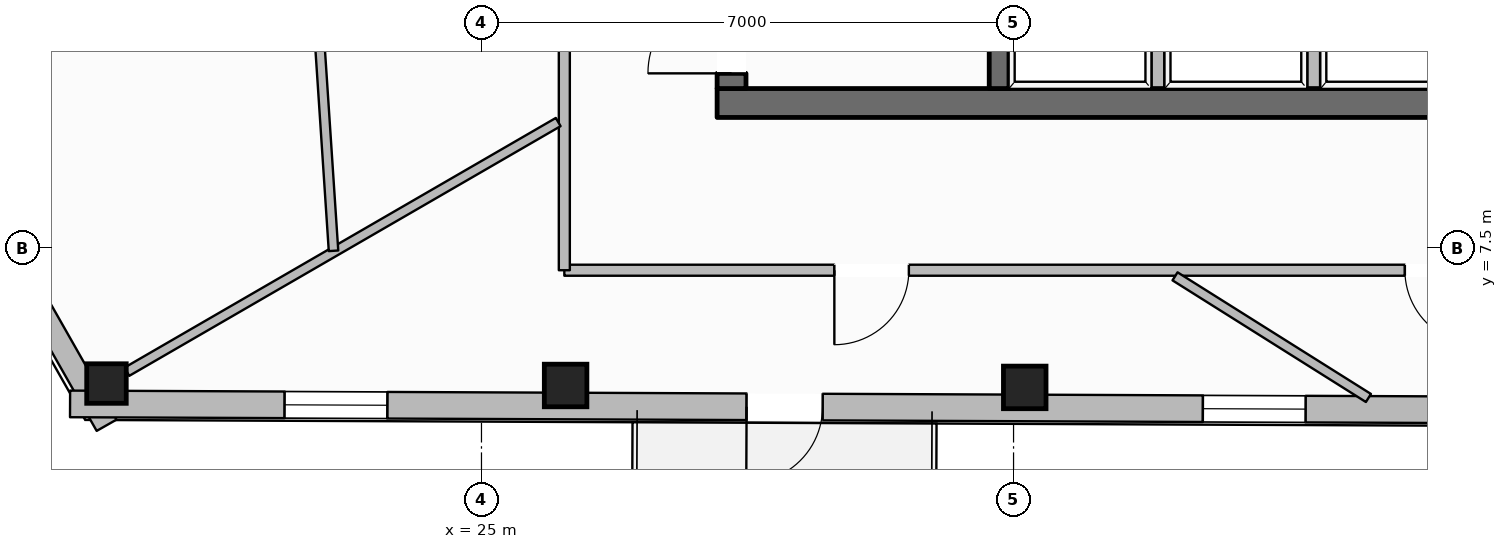
"""IFC4 building model, lengths in metres.
Left out: names, types, materials, properties, quantities, classifications, styles, units other than length and angle.
Written with IfcOpenShell. Run it as: python <this file> out.ifc"""

import sys

from ifc_helpers import new_model, si_unit, direction, frame, frame_2d, origin, origin_2d, place, context, subcontext, project, spatial, rectangle, hollow_rectangle, extrude, element, fill, save


model = new_model("IFC4")
c1 = context("Model", 3, precision=1e-05, world=origin(), true_north=direction((0.0, 1.0)))
c2 = subcontext(c1, "Body", "Model", "MODEL_VIEW")
j1 = project(units=[si_unit("LENGTHUNIT", "METRE"), si_unit("PLANEANGLEUNIT", "RADIAN")], contexts=[c1])
p1 = place(None, origin())
s1 = spatial("IfcSite", under=j1, at=p1, CompositionType="ELEMENT")
p2 = place(p1, origin())
s2 = spatial("IfcBuilding", under=s1, at=p2, CompositionType="ELEMENT")
p3 = place(p2, frame((0.0, 0.0, 239.5)))
s3 = spatial("IfcBuildingStorey", under=s2, at=p3, CompositionType="ELEMENT", Elevation=239.5)
p4 = place(p3, frame((28.1, 9.41, 0.0), z_axis=(0.0, 0.0, 1.0), x_axis=(1.0, 0.0, 0.0)))
e1 = element("IfcWall", 1, at=p4, inside=s3, PredefinedType="SOLIDWALL", context=c2, shape_type="SweptSolid", body=[
    extrude(rectangle(XDim=19.8, YDim=0.38, at=frame_2d((9.9, 0.0))), origin(), (0.0, 0.0, 1.0), 3.61),
])
p5 = place(p4, frame((10.4, 0.0, 0.0)))
e2 = element("IfcOpeningElement", 2, at=p5, cuts=e1, PredefinedType="OPENING", context=c2, shape_type="SweptSolid", body=[
    extrude(rectangle(XDim=1.4, YDim=2.2, at=frame_2d((0.7, 1.1))), frame((0.0, 0.2, 0.0), z_axis=(0.0, -1.0, 0.0), x_axis=(1.0, 0.0, 0.0)), (0.0, 0.0, 1.0), 0.4),
])
p6 = place(p3, frame((28.29, 9.6, 0.0), z_axis=(0.0, 0.0, 1.0), x_axis=(0.0, 1.0, 0.0)))
e3 = element("IfcWall", 3, at=p6, inside=s3, PredefinedType="SOLIDWALL", context=c2, shape_type="SweptSolid", body=[
    extrude(rectangle(XDim=13.0, YDim=0.38, at=frame_2d((6.5, 0.0))), origin(), (0.0, 0.0, 1.0), 3.61),
])
p7 = place(p6, frame((0.2, 0.0, 0.0)))
e4 = element("IfcOpeningElement", 4, at=p7, cuts=e3, PredefinedType="OPENING", context=c2, shape_type="SweptSolid", body=[
    extrude(rectangle(XDim=1.1, YDim=2.15, at=frame_2d((0.55, 1.075))), frame((0.0, 0.2, 0.0), z_axis=(0.0, -1.0, 0.0), x_axis=(1.0, 0.0, 0.0)), (0.0, 0.0, 1.0), 0.4),
])
p8 = place(p6, frame((8.4, 0.0, 0.0)))
e5 = element("IfcOpeningElement", 5, at=p8, cuts=e3, PredefinedType="OPENING", context=c2, shape_type="SweptSolid", body=[
    extrude(rectangle(XDim=0.9, YDim=2.1, at=frame_2d((0.45, 1.05))), frame((0.0, 0.2, 0.0), z_axis=(0.0, -1.0, 0.0), x_axis=(1.0, 0.0, 0.0)), (0.0, 0.0, 1.0), 0.4),
])
p9 = place(p3, frame((31.81, 9.6, 0.0), z_axis=(0.0, 0.0, 1.0), x_axis=(0.0, 1.0, 0.0)))
e6 = element("IfcWall", 6, at=p9, inside=s3, PredefinedType="SHEAR", context=c2, shape_type="SweptSolid", body=[
    extrude(rectangle(XDim=13.0, YDim=0.26, at=frame_2d((6.5, 0.0))), origin(), (0.0, 0.0, 1.0), 3.61),
])
p10 = place(p9, frame((10.925, 0.0, 0.0)))
e7 = element("IfcOpeningElement", 7, at=p10, cuts=e6, PredefinedType="OPENING", context=c2, shape_type="SweptSolid", body=[
    extrude(rectangle(XDim=1.25, YDim=2.25, at=frame_2d((0.625, 1.125))), frame((0.0, 0.14, 0.0), z_axis=(0.0, -1.0, 0.0), x_axis=(1.0, 0.0, 0.0)), (0.0, 0.0, 1.0), 0.28),
])
p11 = place(p3, frame((20.066, 5.719, 0.0), z_axis=(0.0, 0.0, 1.0), x_axis=(1.0, 0.0, 0.0)))
e8 = element("IfcColumn", 8, at=p11, inside=s3, PredefinedType="COLUMN", context=c2, shape_type="SweptSolid", body=[
    extrude(hollow_rectangle(XDim=0.52, YDim=0.52, WallThickness=0.024, at=origin_2d()), origin(), (0.0, 0.0, 1.0), 3.61),
])
for number, where, z_axis, x_axis in (
    (9, (26.107, 5.694, 0.0), (0.0, 0.0, 1.0), (1.0, 0.0, 0.0)),
    (10, (32.147, 5.668, 0.0), (0.0, 0.0, 1.0), (1.0, 0.0, 0.0)),
):
    element("IfcColumn", number, at=place(p3, frame(where, z_axis=z_axis, x_axis=x_axis)), inside=s3, PredefinedType="COLUMN", context=c2, shape_type="SweptSolid", body=[
        extrude(hollow_rectangle(XDim=0.56, YDim=0.56, WallThickness=0.025, at=origin_2d()), origin(), (0.0, 0.0, 1.0), 3.61),
    ])
p12 = place(p3, frame((20.068, 5.17, 0.0), z_axis=(0.0, 0.0, 1.0), x_axis=(-0.494295761475, 0.869293793943, 0.0)))
e11 = element("IfcWall", 11, at=p12, inside=s3, PredefinedType="STANDARD", context=c2, shape_type="SweptSolid", body=[
    extrude(rectangle(XDim=7.836, YDim=0.3, at=frame_2d((3.918, 0.0))), origin(), (0.0, 0.0, 1.0), 3.196),
])
p13 = place(p12, frame((3.393, 0.0, 0.65)))
e12 = element("IfcOpeningElement", 12, at=p13, cuts=e11, PredefinedType="OPENING", context=c2, shape_type="SweptSolid", body=[
    extrude(rectangle(XDim=1.05, YDim=1.7, at=frame_2d((0.525, 0.85))), frame((0.0, 0.16, 0.0), z_axis=(0.0, -1.0, 0.0), x_axis=(1.0, 0.0, 0.0)), (0.0, 0.0, 1.0), 0.32),
])
p14 = place(p3, frame((56.79, 5.294, 0.0), z_axis=(0.0, 0.0, 1.0), x_axis=(-0.999991124913, 0.004213086292, 0.0)))
e13 = element("IfcWall", 13, at=p14, inside=s3, PredefinedType="STANDARD", context=c2, shape_type="SweptSolid", body=[
    extrude(rectangle(XDim=37.203, YDim=0.35, at=frame_2d((18.601, 0.0))), origin(), (0.0, 0.0, 1.0), 3.196),
])
p15 = place(p14, frame((27.302, 0.0, 0.0)))
e14 = element("IfcOpeningElement", 14, at=p15, cuts=e13, PredefinedType="OPENING", context=c2, shape_type="SweptSolid", body=[
    extrude(rectangle(XDim=1.0, YDim=2.2, at=frame_2d((0.5, 1.1))), frame((0.0, 0.185, 0.0), z_axis=(0.0, -1.0, 0.0), x_axis=(1.0, 0.0, 0.0)), (0.0, 0.0, 1.0), 0.37),
])
p16 = place(p14, frame((33.03, 0.0, 0.65)))
e15 = element("IfcOpeningElement", 15, at=p16, cuts=e13, PredefinedType="OPENING", context=c2, shape_type="SweptSolid", body=[
    extrude(rectangle(XDim=1.35, YDim=1.75, at=frame_2d((0.675, 0.875))), frame((0.0, 0.185, 0.0), z_axis=(0.0, -1.0, 0.0), x_axis=(1.0, 0.0, 0.0)), (0.0, 0.0, 1.0), 0.37),
])
p17 = place(p14, frame((20.948, 0.0, 0.65)))
e16 = element("IfcOpeningElement", 16, at=p17, cuts=e13, PredefinedType="OPENING", context=c2, shape_type="SweptSolid", body=[
    extrude(rectangle(XDim=1.35, YDim=1.75, at=frame_2d((0.675, 0.875))), frame((0.0, 0.185, 0.0), z_axis=(0.0, -1.0, 0.0), x_axis=(1.0, 0.0, 0.0)), (0.0, 0.0, 1.0), 0.37),
])
p18 = place(p14, frame((8.868, 0.0, 0.65)))
e17 = element("IfcOpeningElement", 17, at=p18, cuts=e13, PredefinedType="OPENING", context=c2, shape_type="SweptSolid", body=[
    extrude(rectangle(XDim=1.35, YDim=1.75, at=frame_2d((0.675, 0.875))), frame((0.0, 0.185, 0.0), z_axis=(0.0, -1.0, 0.0), x_axis=(1.0, 0.0, 0.0)), (0.0, 0.0, 1.0), 0.37),
])
p19 = place(p14, frame((2.827, 0.0, 0.65)))
e18 = element("IfcOpeningElement", 18, at=p19, cuts=e13, PredefinedType="OPENING", context=c2, shape_type="SweptSolid", body=[
    extrude(rectangle(XDim=1.35, YDim=1.75, at=frame_2d((0.675, 0.875))), frame((0.0, 0.185, 0.0), z_axis=(0.0, -1.0, 0.0), x_axis=(1.0, 0.0, 0.0)), (0.0, 0.0, 1.0), 0.37),
])
for number, where, z_axis, x_axis in (
    (19, (33.9, 9.49, 0.0), (0.0, 0.0, 1.0), (0.0, 1.0, 0.0)),
    (20, (35.95, 9.49, 0.0), (0.0, 0.0, 1.0), (0.0, 1.0, 0.0)),
):
    element("IfcWall", number, at=place(p3, frame(where, z_axis=z_axis, x_axis=x_axis)), inside=s3, PredefinedType="PARTITIONING", context=c2, shape_type="SweptSolid", body=[
        extrude(rectangle(XDim=2.35, YDim=0.165, at=frame_2d((1.175, 0.0))), origin(), (0.0, 0.0, 1.0), 3.61),
    ])
p20 = place(p3, frame((49.91, 7.21, 0.0), z_axis=(0.0, 0.0, 1.0), x_axis=(-1.0, 0.0, 0.0)))
e21 = element("IfcWall", 21, at=p20, inside=s3, PredefinedType="PARTITIONING", context=c2, shape_type="SweptSolid", body=[
    extrude(rectangle(XDim=23.82, YDim=0.145, at=frame_2d((11.91, 0.0))), origin(), (0.0, 0.0, 1.0), 3.61),
])
p21 = place(p20, frame((11.781, 0.0, 0.0)))
e22 = element("IfcOpeningElement", 22, at=p21, cuts=e21, PredefinedType="OPENING", context=c2, shape_type="SweptSolid", body=[
    extrude(rectangle(XDim=0.98, YDim=2.15, at=frame_2d((0.49, 1.075))), frame((0.0, 0.083, 0.0), z_axis=(0.0, -1.0, 0.0), x_axis=(1.0, 0.0, 0.0)), (0.0, 0.0, 1.0), 0.165),
])
p22 = place(p20, frame((19.288, 0.0, 0.0)))
e23 = element("IfcOpeningElement", 23, at=p22, cuts=e21, PredefinedType="OPENING", context=c2, shape_type="SweptSolid", body=[
    extrude(rectangle(XDim=0.98, YDim=2.15, at=frame_2d((0.49, 1.075))), frame((0.0, 0.083, 0.0), z_axis=(0.0, -1.0, 0.0), x_axis=(1.0, 0.0, 0.0)), (0.0, 0.0, 1.0), 0.165),
])
p23 = place(p20, frame((2.473, 0.0, 0.0)))
e24 = element("IfcOpeningElement", 24, at=p23, cuts=e21, PredefinedType="OPENING", context=c2, shape_type="SweptSolid", body=[
    extrude(rectangle(XDim=1.4, YDim=2.2, at=frame_2d((0.7, 1.1))), frame((0.0, 0.083, 0.0), z_axis=(0.0, -1.0, 0.0), x_axis=(1.0, 0.0, 0.0)), (0.0, 0.0, 1.0), 0.165),
])
p24 = place(p3, frame((26.09, 7.21, 0.0), z_axis=(0.0, 0.0, 1.0), x_axis=(0.0, 1.0, 0.0)))
e25 = element("IfcWall", 25, at=p24, inside=s3, PredefinedType="PARTITIONING", context=c2, shape_type="SweptSolid", body=[
    extrude(rectangle(XDim=17.78, YDim=0.145, at=frame_2d((8.89, 0.0))), origin(), (0.0, 0.0, 1.0), 3.349),
])
p25 = place(p24, frame((9.305, 0.0, 0.0)))
e26 = element("IfcOpeningElement", 26, at=p25, cuts=e25, PredefinedType="OPENING", context=c2, shape_type="SweptSolid", body=[
    extrude(rectangle(XDim=0.98, YDim=2.15, at=frame_2d((0.49, 1.075))), frame((0.0, 0.083, 0.0), z_axis=(0.0, -1.0, 0.0), x_axis=(1.0, 0.0, 0.0)), (0.0, 0.0, 1.0), 0.165),
])
p26 = place(p3, frame((26.01, 9.159, 0.0), z_axis=(0.0, 0.0, 1.0), x_axis=(-0.865468767554, -0.500962885241, 0.0)))
e27 = element("IfcWall", 27, at=p26, inside=s3, PredefinedType="PARTITIONING", context=c2, shape_type="SweptSolid", body=[
    extrude(rectangle(XDim=6.557, YDim=0.125, at=frame_2d((3.279, 0.0))), origin(), (0.0, 0.0, 1.0), 3.246),
])
p27 = place(p3, frame((22.114, 21.633, 0.0), z_axis=(0.0, 0.0, 1.0), x_axis=(0.06614923697, -0.997809740606, 0.0)))
e28 = element("IfcWall", 28, at=p27, inside=s3, PredefinedType="PARTITIONING", context=c2, shape_type="SweptSolid", body=[
    extrude(rectangle(XDim=14.198, YDim=0.125, at=frame_2d((7.099, 0.0))), origin(), (0.0, 0.0, 1.0), 3.349),
])
p28 = place(p27, frame((6.473, 0.0, 0.0)))
e29 = element("IfcOpeningElement", 29, at=p28, cuts=e28, PredefinedType="OPENING", context=c2, shape_type="SweptSolid", body=[
    extrude(rectangle(XDim=1.02, YDim=2.15, at=frame_2d((0.51, 1.075))), frame((0.0, 0.073, 0.0), z_axis=(0.0, -1.0, 0.0), x_axis=(1.0, 0.0, 0.0)), (0.0, 0.0, 1.0), 0.145),
])
p29 = place(p3, frame((34.125, 7.129, 0.0), z_axis=(0.0, 0.0, 1.0), x_axis=(0.846525696198, -0.532347861531, 0.0)))
e30 = element("IfcWall", 30, at=p29, inside=s3, PredefinedType="PARTITIONING", context=c2, shape_type="SweptSolid", body=[
    extrude(rectangle(XDim=3.006, YDim=0.125, at=frame_2d((1.503, 0.0))), origin(), (0.0, 0.0, 1.0), 3.61),
])
p30 = place(p15, origin())
e31 = element("IfcDoor", 31, at=p30, inside=s3, OperationType="SINGLE_SWING_RIGHT", PredefinedType="DOOR", context=c2, shape_type="SweptSolid", body=[
    extrude(rectangle(XDim=1.0, YDim=2.2, at=frame_2d((0.5, 1.1))), frame((0.0, 0.025, 0.0), z_axis=(0.0, -1.0, 0.0), x_axis=(1.0, 0.0, 0.0)), (0.0, 0.0, 1.0), 0.05),
])
fill(e14, e31)
p31 = place(p16, origin())
e32 = element("IfcWindow", 32, at=p31, inside=s3, PartitioningType="SINGLE_PANEL", PredefinedType="WINDOW", context=c2, shape_type="SweptSolid", body=[
    extrude(rectangle(XDim=1.35, YDim=1.75, at=frame_2d((0.675, 0.875))), frame((0.0, 0.03, 0.0), z_axis=(0.0, -1.0, 0.0), x_axis=(1.0, 0.0, 0.0)), (0.0, 0.0, 1.0), 0.06),
])
fill(e15, e32)
p32 = place(p17, origin())
e33 = element("IfcWindow", 33, at=p32, inside=s3, PartitioningType="SINGLE_PANEL", PredefinedType="WINDOW", context=c2, shape_type="SweptSolid", body=[
    extrude(rectangle(XDim=1.35, YDim=1.75, at=frame_2d((0.675, 0.875))), frame((0.0, 0.03, 0.0), z_axis=(0.0, -1.0, 0.0), x_axis=(1.0, 0.0, 0.0)), (0.0, 0.0, 1.0), 0.06),
])
fill(e16, e33)
p33 = place(p7, origin())
e34 = element("IfcDoor", 34, at=p33, inside=s3, OperationType="SINGLE_SWING_LEFT", PredefinedType="DOOR", context=c2, shape_type="SweptSolid", body=[
    extrude(rectangle(XDim=1.1, YDim=2.15, at=frame_2d((0.55, 1.075))), frame((0.0, 0.025, 0.0), z_axis=(0.0, -1.0, 0.0), x_axis=(1.0, 0.0, 0.0)), (0.0, 0.0, 1.0), 0.05),
])
fill(e4, e34)
p34 = place(p21, origin())
e35 = element("IfcDoor", 35, at=p34, inside=s3, OperationType="SINGLE_SWING_LEFT", PredefinedType="DOOR", context=c2, shape_type="SweptSolid", body=[
    extrude(rectangle(XDim=0.98, YDim=2.15, at=frame_2d((0.49, 1.075))), frame((0.0, 0.025, 0.0), z_axis=(0.0, -1.0, 0.0), x_axis=(1.0, 0.0, 0.0)), (0.0, 0.0, 1.0), 0.05),
])
fill(e22, e35)
p35 = place(p22, origin())
e36 = element("IfcDoor", 36, at=p35, inside=s3, OperationType="SINGLE_SWING_RIGHT", PredefinedType="DOOR", context=c2, shape_type="SweptSolid", body=[
    extrude(rectangle(XDim=0.98, YDim=2.15, at=frame_2d((0.49, 1.075))), frame((0.0, 0.025, 0.0), z_axis=(0.0, -1.0, 0.0), x_axis=(1.0, 0.0, 0.0)), (0.0, 0.0, 1.0), 0.05),
])
fill(e23, e36)
save(model, sys.argv[1])
